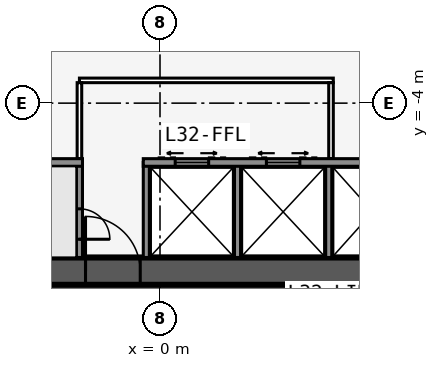
"""IFC4 building model, lengths in metres.
Left out: names, types, materials, properties, quantities, classifications, styles, units other than length and angle.
Written with IfcOpenShell. Run it as: python <this file> out.ifc"""

import sys

from ifc_helpers import new_model, si_unit, direction, frame, frame_2d, origin, place, context, subcontext, project, spatial, rectangle, extrude, element, fill, save


model = new_model("IFC4")
c1 = context("Model", 3, precision=1e-05, world=origin(), true_north=direction((0.0, 1.0)))
c2 = subcontext(c1, "Body", "Model", "MODEL_VIEW")
j1 = project(units=[si_unit("LENGTHUNIT", "METRE"), si_unit("PLANEANGLEUNIT", "RADIAN")], contexts=[c1])
p1 = place(None, origin())
s1 = spatial("IfcSite", under=j1, at=p1, CompositionType="ELEMENT")
p2 = place(p1, origin())
s2 = spatial("IfcBuilding", under=s1, at=p2, CompositionType="ELEMENT")
p3 = place(p2, frame((0.0, 0.0, 124.9)))
s3 = spatial("IfcBuildingStorey", under=s2, at=p3, CompositionType="ELEMENT", Elevation=124.9)
p4 = place(p3, frame((-16.5, -9.526, 0.0), z_axis=(0.0, 0.0, 1.0), x_axis=(1.0, 0.0, 0.0)))
e1 = element("IfcWall", 1, at=p4, inside=s3, PredefinedType="SHEAR", context=c2, shape_type="SweptSolid", body=[
    extrude(rectangle(XDim=33.0, YDim=0.9, at=frame_2d((16.5, 0.0))), origin(), (0.0, 0.0, 1.0), 3.4),
])
p5 = place(p4, frame((14.05, 0.0, 0.0)))
e2 = element("IfcOpeningElement", 2, at=p5, cuts=e1, PredefinedType="OPENING", context=c2, shape_type="SweptSolid", body=[
    extrude(rectangle(XDim=1.8, YDim=2.13, at=frame_2d((0.9, 1.065))), frame((0.0, 0.46, 0.0), z_axis=(0.0, -1.0, 0.0), x_axis=(1.0, 0.0, 0.0)), (0.0, 0.0, 1.0), 0.92),
])
p6 = place(p3, frame((-10.183, -5.951, 0.0), z_axis=(0.0, 0.0, 1.0), x_axis=(1.0, 0.0, 0.0)))
e3 = element("IfcWall", 3, at=p6, inside=s3, PredefinedType="SOLIDWALL", context=c2, shape_type="SweptSolid", body=[
    extrude(rectangle(XDim=7.633, YDim=0.25, at=frame_2d((3.816, 0.0))), origin(), (0.0, 0.0, 1.0), 3.235),
])
p7 = place(p3, frame((-0.55, -5.951, 0.0), z_axis=(0.0, 0.0, 1.0), x_axis=(1.0, 0.0, 0.0)))
e4 = element("IfcWall", 4, at=p7, inside=s3, PredefinedType="SOLIDWALL", context=c2, shape_type="SweptSolid", body=[
    extrude(rectangle(XDim=10.733, YDim=0.25, at=frame_2d((5.366, 0.0))), origin(), (0.0, 0.0, 1.0), 3.235),
])
p8 = place(p7, frame((9.314, 0.0, 0.0)))
e5 = element("IfcOpeningElement", 5, at=p8, cuts=e4, PredefinedType="OPENING", context=c2, shape_type="SweptSolid", body=[
    extrude(rectangle(XDim=0.9, YDim=2.13, at=frame_2d((0.45, 1.065))), frame((0.0, 0.135, 0.0), z_axis=(0.0, -1.0, 0.0), x_axis=(1.0, 0.0, 0.0)), (0.0, 0.0, 1.0), 0.27),
])
p9 = place(p7, frame((1.05, 0.0, 0.0)))
e6 = element("IfcOpeningElement", 6, at=p9, cuts=e4, PredefinedType="OPENING", context=c2, shape_type="SweptSolid", body=[
    extrude(rectangle(XDim=1.1, YDim=2.13, at=frame_2d((0.55, 1.065))), frame((0.0, 0.135, 0.0), z_axis=(0.0, -1.0, 0.0), x_axis=(1.0, 0.0, 0.0)), (0.0, 0.0, 1.0), 0.27),
])
p10 = place(p7, frame((4.05, 0.0, 0.0)))
e7 = element("IfcOpeningElement", 7, at=p10, cuts=e4, PredefinedType="OPENING", context=c2, shape_type="SweptSolid", body=[
    extrude(rectangle(XDim=1.1, YDim=2.13, at=frame_2d((0.55, 1.065))), frame((0.0, 0.135, 0.0), z_axis=(0.0, -1.0, 0.0), x_axis=(1.0, 0.0, 0.0)), (0.0, 0.0, 1.0), 0.27),
])
p11 = place(p3, frame((-2.65, -5.951, 0.0), z_axis=(0.0, 0.0, 1.0), x_axis=(0.0, -1.0, 0.0)))
e8 = element("IfcWall", 8, at=p11, inside=s3, PredefinedType="SOLIDWALL", context=c2, shape_type="SweptSolid", body=[
    extrude(rectangle(XDim=3.125, YDim=0.2, at=frame_2d((1.562, 0.0))), origin(), (0.0, 0.0, 1.0), 3.235),
])
p12 = place(p11, frame((1.525, 0.0, 0.0)))
e9 = element("IfcOpeningElement", 9, at=p12, cuts=e8, PredefinedType="OPENING", context=c2, shape_type="SweptSolid", body=[
    extrude(rectangle(XDim=1.0, YDim=2.13, at=frame_2d((0.5, 1.065))), frame((0.0, 0.11, 0.0), z_axis=(0.0, -1.0, 0.0), x_axis=(1.0, 0.0, 0.0)), (0.0, 0.0, 1.0), 0.22),
])
for number, where, z_axis, x_axis in (
    (10, (-0.45, -5.951, 0.0), (0.0, 0.0, 1.0), (0.0, -1.0, 0.0)),
    (11, (2.55, -5.951, 0.0), (0.0, 0.0, 1.0), (0.0, -1.0, 0.0)),
    (12, (5.55, -5.951, 0.0), (0.0, 0.0, 1.0), (0.0, -1.0, 0.0)),
):
    element("IfcWall", number, at=place(p3, frame(where, z_axis=z_axis, x_axis=x_axis)), inside=s3, PredefinedType="SOLIDWALL", context=c2, shape_type="SweptSolid", body=[
        extrude(rectangle(XDim=3.125, YDim=0.2, at=frame_2d((1.562, 0.0))), origin(), (0.0, 0.0, 1.0), 3.235),
    ])
p13 = place(p3, frame((16.5, -9.526, 0.0), z_axis=(0.0, 0.0, 1.0), x_axis=(-0.499999749417, 0.866025548458, 0.0)))
e13 = element("IfcWall", 13, at=p13, inside=s3, PredefinedType="SHEAR", context=c2, shape_type="SweptSolid", body=[
    extrude(rectangle(XDim=33.0, YDim=0.9, at=frame_2d((16.5, 0.0))), origin(), (0.0, 0.0, 1.0), 3.4),
])
p14 = place(p13, frame((14.15, 0.0, 0.0)))
e14 = element("IfcOpeningElement", 14, at=p14, cuts=e13, PredefinedType="OPENING", context=c2, shape_type="SweptSolid", body=[
    extrude(rectangle(XDim=1.8, YDim=2.13, at=frame_2d((0.9, 1.065))), frame((0.0, 0.46, 0.0), z_axis=(0.0, -1.0, 0.0), x_axis=(1.0, 0.0, 0.0)), (0.0, 0.0, 1.0), 0.92),
])
p15 = place(p13, frame((12.6, 0.0, 0.0)))
e15 = element("IfcOpeningElement", 15, at=p15, cuts=e13, PredefinedType="OPENING", context=c2, shape_type="SweptSolid", body=[
    extrude(rectangle(XDim=1.0, YDim=2.13, at=frame_2d((0.5, 1.065))), frame((0.0, 0.46, 0.0), z_axis=(0.0, -1.0, 0.0), x_axis=(1.0, 0.0, 0.0)), (0.0, 0.0, 1.0), 0.92),
])
p16 = place(p3, frame((10.245, -5.843, 0.0), z_axis=(0.0, 0.0, 1.0), x_axis=(-0.499993009313, 0.866029439822, 0.0)))
e16 = element("IfcWall", 16, at=p16, inside=s3, PredefinedType="SOLIDWALL", context=c2, shape_type="SweptSolid", body=[
    extrude(rectangle(XDim=7.733, YDim=0.25, at=frame_2d((3.866, 0.0))), origin(), (0.0, 0.0, 1.0), 3.235),
])
p17 = place(p3, frame((0.0, 19.052, 0.0), z_axis=(0.0, 0.0, 1.0), x_axis=(-0.499999749417, -0.866025548458, 0.0)))
e17 = element("IfcWall", 17, at=p17, inside=s3, PredefinedType="SHEAR", context=c2, shape_type="SweptSolid", body=[
    extrude(rectangle(XDim=33.0, YDim=0.9, at=frame_2d((16.5, 0.0))), origin(), (0.0, 0.0, 1.0), 3.4),
])
p18 = place(p17, frame((14.15, 0.0, 0.0)))
e18 = element("IfcOpeningElement", 18, at=p18, cuts=e17, PredefinedType="OPENING", context=c2, shape_type="SweptSolid", body=[
    extrude(rectangle(XDim=1.8, YDim=2.13, at=frame_2d((0.9, 1.065))), frame((0.0, 0.46, 0.0), z_axis=(0.0, -1.0, 0.0), x_axis=(1.0, 0.0, 0.0)), (0.0, 0.0, 1.0), 0.92),
])
p19 = place(p17, frame((12.6, 0.0, 0.0)))
e19 = element("IfcOpeningElement", 19, at=p19, cuts=e17, PredefinedType="OPENING", context=c2, shape_type="SweptSolid", body=[
    extrude(rectangle(XDim=1.0, YDim=2.13, at=frame_2d((0.5, 1.065))), frame((0.0, 0.46, 0.0), z_axis=(0.0, -1.0, 0.0), x_axis=(1.0, 0.0, 0.0)), (0.0, 0.0, 1.0), 0.92),
])
p20 = place(p3, frame((21.586, -11.885, 0.0), z_axis=(0.0, 0.0, 1.0), x_axis=(-0.500001915564, 0.86602429783, 0.0)))
e20 = element("IfcWall", 20, at=p20, inside=s3, PredefinedType="PARTITIONING", context=c2, shape_type="SweptSolid", body=[
    extrude(rectangle(XDim=42.172, YDim=0.15, at=frame_2d((21.086, 0.0))), origin(), (0.0, 0.0, 1.0), 3.235),
])
p21 = place(p20, frame((1.911, 0.0, 0.0)))
e21 = element("IfcOpeningElement", 21, at=p21, cuts=e20, PredefinedType="OPENING", context=c2, shape_type="SweptSolid", body=[
    extrude(rectangle(XDim=0.95, YDim=2.13, at=frame_2d((0.475, 1.065))), frame((0.0, 0.085, 0.0), z_axis=(0.0, -1.0, 0.0), x_axis=(1.0, 0.0, 0.0)), (0.0, 0.0, 1.0), 0.17),
])
p22 = place(p20, frame((7.511, 0.0, 0.0)))
e22 = element("IfcOpeningElement", 22, at=p22, cuts=e20, PredefinedType="OPENING", context=c2, shape_type="SweptSolid", body=[
    extrude(rectangle(XDim=0.95, YDim=2.13, at=frame_2d((0.475, 1.065))), frame((0.0, 0.085, 0.0), z_axis=(0.0, -1.0, 0.0), x_axis=(1.0, 0.0, 0.0)), (0.0, 0.0, 1.0), 0.17),
])
p23 = place(p20, frame((14.311, 0.0, 0.0)))
e23 = element("IfcOpeningElement", 23, at=p23, cuts=e20, PredefinedType="OPENING", context=c2, shape_type="SweptSolid", body=[
    extrude(rectangle(XDim=0.95, YDim=2.13, at=frame_2d((0.475, 1.065))), frame((0.0, 0.085, 0.0), z_axis=(0.0, -1.0, 0.0), x_axis=(1.0, 0.0, 0.0)), (0.0, 0.0, 1.0), 0.17),
])
p24 = place(p20, frame((22.511, 0.0, 0.0)))
e24 = element("IfcOpeningElement", 24, at=p24, cuts=e20, PredefinedType="OPENING", context=c2, shape_type="SweptSolid", body=[
    extrude(rectangle(XDim=0.95, YDim=2.13, at=frame_2d((0.475, 1.065))), frame((0.0, 0.085, 0.0), z_axis=(0.0, -1.0, 0.0), x_axis=(1.0, 0.0, 0.0)), (0.0, 0.0, 1.0), 0.17),
])
p25 = place(p20, frame((29.311, 0.0, 0.0)))
e25 = element("IfcOpeningElement", 25, at=p25, cuts=e20, PredefinedType="OPENING", context=c2, shape_type="SweptSolid", body=[
    extrude(rectangle(XDim=0.95, YDim=2.13, at=frame_2d((0.475, 1.065))), frame((0.0, 0.085, 0.0), z_axis=(0.0, -1.0, 0.0), x_axis=(1.0, 0.0, 0.0)), (0.0, 0.0, 1.0), 0.17),
])
p26 = place(p20, frame((39.311, 0.0, 0.0)))
e26 = element("IfcOpeningElement", 26, at=p26, cuts=e20, PredefinedType="OPENING", context=c2, shape_type="SweptSolid", body=[
    extrude(rectangle(XDim=0.95, YDim=2.13, at=frame_2d((0.475, 1.065))), frame((0.0, 0.085, 0.0), z_axis=(0.0, -1.0, 0.0), x_axis=(1.0, 0.0, 0.0)), (0.0, 0.0, 1.0), 0.17),
])
p27 = place(p3, frame((-0.5, 22.836, 0.0), z_axis=(0.0, 0.0, 1.0), x_axis=(-0.500001677587, -0.866024435227, 0.0)))
e27 = element("IfcWall", 27, at=p27, inside=s3, PredefinedType="PARTITIONING", context=c2, shape_type="SweptSolid", body=[
    extrude(rectangle(XDim=39.054, YDim=0.15, at=frame_2d((19.527, 0.0))), origin(), (0.0, 0.0, 1.0), 3.235),
])
p28 = place(p27, frame((0.352, 0.0, 0.0)))
e28 = element("IfcOpeningElement", 28, at=p28, cuts=e27, PredefinedType="OPENING", context=c2, shape_type="SweptSolid", body=[
    extrude(rectangle(XDim=0.95, YDim=2.13, at=frame_2d((0.475, 1.065))), frame((0.0, 0.085, 0.0), z_axis=(0.0, -1.0, 0.0), x_axis=(1.0, 0.0, 0.0)), (0.0, 0.0, 1.0), 0.17),
])
p29 = place(p27, frame((5.952, 0.0, 0.0)))
e29 = element("IfcOpeningElement", 29, at=p29, cuts=e27, PredefinedType="OPENING", context=c2, shape_type="SweptSolid", body=[
    extrude(rectangle(XDim=0.95, YDim=2.13, at=frame_2d((0.475, 1.065))), frame((0.0, 0.085, 0.0), z_axis=(0.0, -1.0, 0.0), x_axis=(1.0, 0.0, 0.0)), (0.0, 0.0, 1.0), 0.17),
])
p30 = place(p27, frame((12.152, 0.0, 0.0)))
e30 = element("IfcOpeningElement", 30, at=p30, cuts=e27, PredefinedType="OPENING", context=c2, shape_type="SweptSolid", body=[
    extrude(rectangle(XDim=0.95, YDim=2.13, at=frame_2d((0.475, 1.065))), frame((0.0, 0.085, 0.0), z_axis=(0.0, -1.0, 0.0), x_axis=(1.0, 0.0, 0.0)), (0.0, 0.0, 1.0), 0.17),
])
p31 = place(p27, frame((15.352, 0.0, 0.0)))
e31 = element("IfcOpeningElement", 31, at=p31, cuts=e27, PredefinedType="OPENING", context=c2, shape_type="SweptSolid", body=[
    extrude(rectangle(XDim=0.95, YDim=2.13, at=frame_2d((0.475, 1.065))), frame((0.0, 0.085, 0.0), z_axis=(0.0, -1.0, 0.0), x_axis=(1.0, 0.0, 0.0)), (0.0, 0.0, 1.0), 0.17),
])
p32 = place(p27, frame((22.152, 0.0, 0.0)))
e32 = element("IfcOpeningElement", 32, at=p32, cuts=e27, PredefinedType="OPENING", context=c2, shape_type="SweptSolid", body=[
    extrude(rectangle(XDim=0.95, YDim=2.13, at=frame_2d((0.475, 1.065))), frame((0.0, 0.085, 0.0), z_axis=(0.0, -1.0, 0.0), x_axis=(1.0, 0.0, 0.0)), (0.0, 0.0, 1.0), 0.17),
])
p33 = place(p27, frame((30.352, 0.0, 0.0)))
e33 = element("IfcOpeningElement", 33, at=p33, cuts=e27, PredefinedType="OPENING", context=c2, shape_type="SweptSolid", body=[
    extrude(rectangle(XDim=0.95, YDim=2.13, at=frame_2d((0.475, 1.065))), frame((0.0, 0.085, 0.0), z_axis=(0.0, -1.0, 0.0), x_axis=(1.0, 0.0, 0.0)), (0.0, 0.0, 1.0), 0.17),
])
p34 = place(p27, frame((37.752, 0.0, 0.0)))
e34 = element("IfcOpeningElement", 34, at=p34, cuts=e27, PredefinedType="OPENING", context=c2, shape_type="SweptSolid", body=[
    extrude(rectangle(XDim=0.95, YDim=2.13, at=frame_2d((0.475, 1.065))), frame((0.0, 0.085, 0.0), z_axis=(0.0, -1.0, 0.0), x_axis=(1.0, 0.0, 0.0)), (0.0, 0.0, 1.0), 0.17),
])
p35 = place(p3, frame((-2.65, -3.251, 0.0), z_axis=(0.0, 0.0, 1.0), x_axis=(1.0, 0.0, 0.0)))
e35 = element("IfcWall", 35, at=p35, inside=s3, PredefinedType="PARTITIONING", context=c2, shape_type="SweptSolid", body=[
    extrude(rectangle(XDim=8.35, YDim=0.15, at=frame_2d((4.175, 0.0))), origin(), (0.0, 0.0, 1.0), 3.235),
])
for number, where, z_axis, x_axis in (
    (36, (-2.65, -5.826, 0.0), (0.0, 0.0, 1.0), (0.0, 1.0, 0.0)),
    (37, (5.625, -5.826, 0.0), (0.0, 0.0, 1.0), (0.0, 1.0, 0.0)),
):
    element("IfcWall", number, at=place(p3, frame(where, z_axis=z_axis, x_axis=x_axis)), inside=s3, PredefinedType="PARTITIONING", context=c2, shape_type="SweptSolid", body=[
        extrude(rectangle(XDim=2.5, YDim=0.15, at=frame_2d((1.25, 0.0))), origin(), (0.0, 0.0, 1.0), 3.235),
    ])
p36 = place(p5, origin())
e38 = element("IfcDoor", 38, at=p36, inside=s3, OperationType="DOUBLE_DOOR_SINGLE_SWING", PredefinedType="DOOR", context=c2, shape_type="SweptSolid", body=[
    extrude(rectangle(XDim=1.8, YDim=2.13, at=frame_2d((0.9, 1.065))), frame((0.0, 0.025, 0.0), z_axis=(0.0, -1.0, 0.0), x_axis=(1.0, 0.0, 0.0)), (0.0, 0.0, 1.0), 0.05),
])
fill(e2, e38)
p37 = place(p12, origin())
e39 = element("IfcDoor", 39, at=p37, inside=s3, OperationType="SINGLE_SWING_RIGHT", PredefinedType="DOOR", context=c2, shape_type="SweptSolid", body=[
    extrude(rectangle(XDim=1.0, YDim=2.13, at=frame_2d((0.5, 1.065))), frame((0.0, 0.025, 0.0), z_axis=(0.0, -1.0, 0.0), x_axis=(1.0, 0.0, 0.0)), (0.0, 0.0, 1.0), 0.05),
])
fill(e9, e39)
p38 = place(p9, origin())
e40 = element("IfcDoor", 40, at=p38, inside=s3, OperationType="DOUBLE_DOOR_SLIDING", PredefinedType="USERDEFINED", context=c2, shape_type="SweptSolid", body=[
    extrude(rectangle(XDim=1.1, YDim=2.13, at=frame_2d((0.55, 1.065))), frame((0.0, 0.025, 0.0), z_axis=(0.0, -1.0, 0.0), x_axis=(1.0, 0.0, 0.0)), (0.0, 0.0, 1.0), 0.05),
])
fill(e6, e40)
p39 = place(p10, origin())
e41 = element("IfcDoor", 41, at=p39, inside=s3, OperationType="DOUBLE_DOOR_SLIDING", PredefinedType="USERDEFINED", context=c2, shape_type="SweptSolid", body=[
    extrude(rectangle(XDim=1.1, YDim=2.13, at=frame_2d((0.55, 1.065))), frame((0.0, 0.025, 0.0), z_axis=(0.0, -1.0, 0.0), x_axis=(1.0, 0.0, 0.0)), (0.0, 0.0, 1.0), 0.05),
])
fill(e7, e41)
save(model, sys.argv[1])
